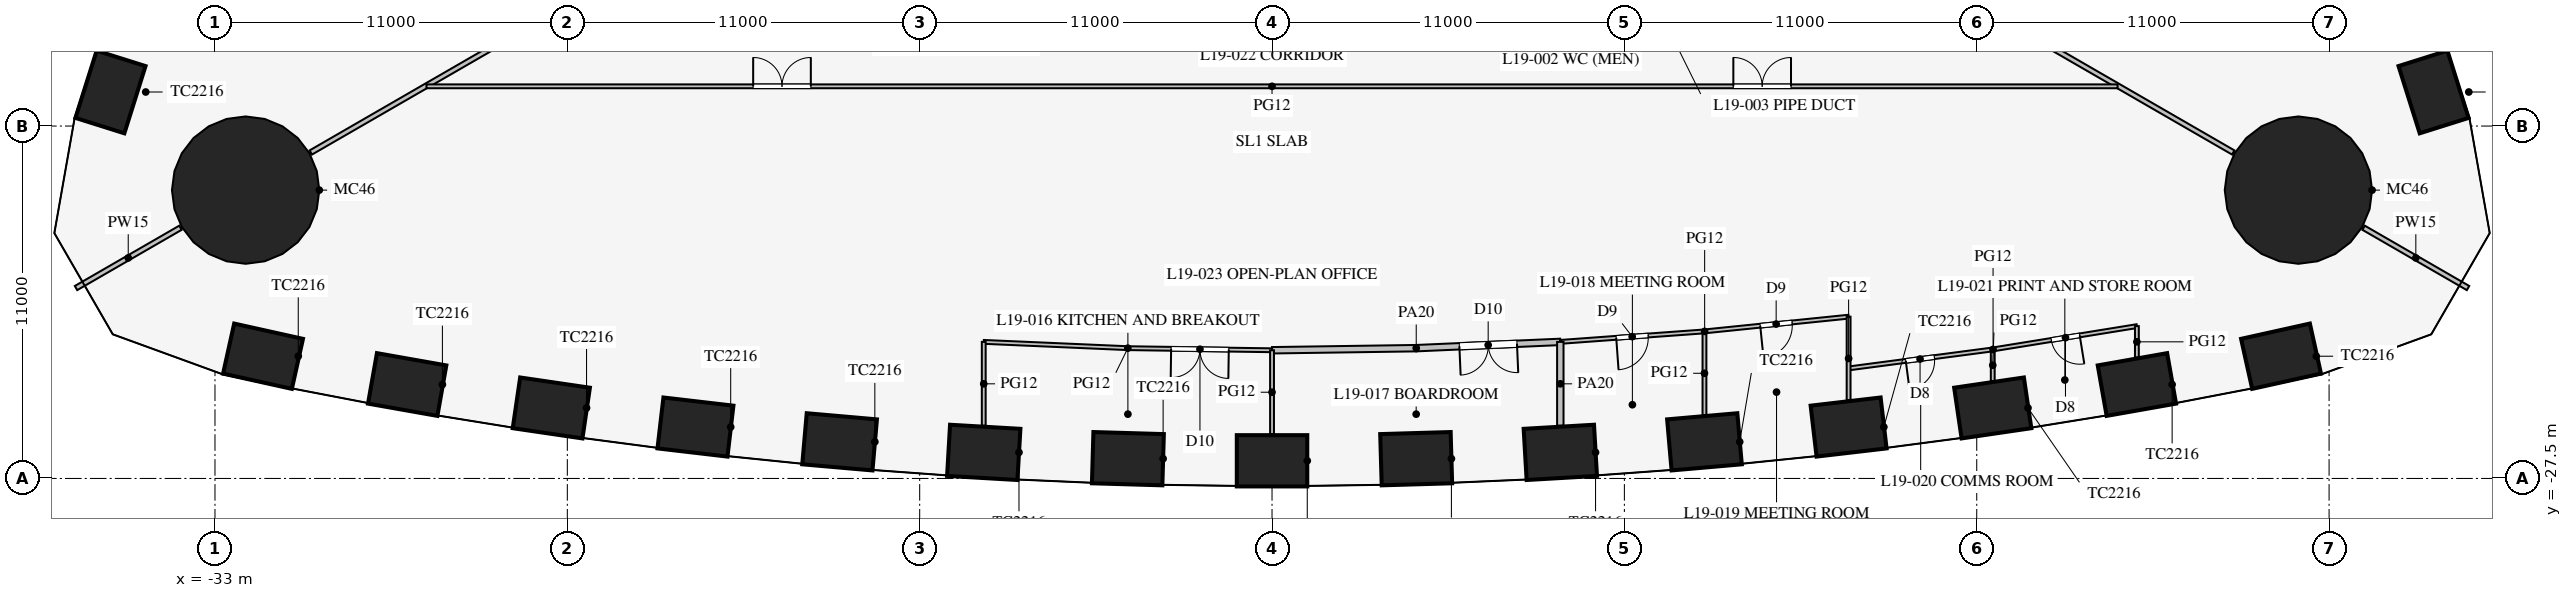
"""IFC4 building model, lengths in metres.
Left out: names, types, materials, properties, quantities, classifications, styles, units other than length and angle.
Written with IfcOpenShell. Run it as: python <this file> out.ifc"""

import sys

from ifc_helpers import new_model, si_unit, direction, frame, frame_2d, origin, origin_2d, place, context, subcontext, project, spatial, rectangle, circle, extrude, element, fill, save


model = new_model("IFC4")
c1 = context("Model", 3, precision=1e-05, world=origin(), true_north=direction((0.0, 1.0)))
c2 = subcontext(c1, "Body", "Model", "MODEL_VIEW")
j1 = project(units=[si_unit("LENGTHUNIT", "METRE"), si_unit("PLANEANGLEUNIT", "RADIAN")], contexts=[c1])
p1 = place(None, origin())
s1 = spatial("IfcSite", under=j1, at=p1, CompositionType="ELEMENT")
p2 = place(p1, origin())
s2 = spatial("IfcBuilding", under=s1, at=p2, CompositionType="ELEMENT")
p3 = place(p2, frame((0.0, 0.0, 83.7)))
s3 = spatial("IfcBuildingStorey", under=s2, at=p3, CompositionType="ELEMENT", Elevation=83.7)
for number, where, z_axis, x_axis in (
    (1, (-31.5, -23.685, 0.0), (0.0, 0.0, 1.0), (0.976, -0.217, 0.0)),
    (2, (-27.0, -24.568, 0.0), (0.0, 0.0, 1.0), (0.985, -0.174, 0.0)),
    (3, (-22.5, -25.299, 0.0), (0.0, 0.0, 1.0), (0.989, -0.145, 0.0)),
    (4, (-18.0, -25.895, 0.0), (0.0, 0.0, 1.0), (0.993, -0.116, 0.0)),
    (5, (-13.5, -26.357, 0.0), (0.0, 0.0, 1.0), (0.996, -0.087, 0.0)),
    (6, (-9.0, -26.686, 0.0), (0.0, 0.0, 1.0), (0.998, -0.058, 0.0)),
    (7, (-4.5, -26.883, 0.0), (0.0, 0.0, 1.0), (1.0, -0.029, 0.0)),
    (8, (0.0, -26.949, 0.0), (0.0, 0.0, 1.0), (1.0, 0.0, 0.0)),
    (9, (4.5, -26.883, 0.0), (0.0, 0.0, 1.0), (1.0, 0.029, 0.0)),
    (10, (9.0, -26.686, 0.0), (0.0, 0.0, 1.0), (0.998, 0.058, 0.0)),
    (11, (13.5, -26.357, 0.0), (0.0, 0.0, 1.0), (0.996, 0.087, 0.0)),
    (12, (18.0, -25.895, 0.0), (0.0, 0.0, 1.0), (0.993, 0.116, 0.0)),
    (13, (22.5, -25.299, 0.0), (0.0, 0.0, 1.0), (0.989, 0.145, 0.0)),
    (14, (27.0, -24.568, 0.0), (0.0, 0.0, 1.0), (0.985, 0.174, 0.0)),
    (15, (31.5, -23.685, 0.0), (0.0, 0.0, 1.0), (0.976, 0.217, 0.0)),
    (16, (36.262, -15.438, 0.0), (0.0, 0.0, 1.0), (-0.3, 0.954, 0.0)),
    (17, (-36.262, -15.438, 0.0), (0.0, 0.0, 1.0), (-0.3, -0.954, 0.0)),
):
    element("IfcColumn", number, at=place(p3, frame(where, z_axis=z_axis, x_axis=x_axis)), inside=s3, PredefinedType="COLUMN", context=c2, shape_type="SweptSolid", body=[
        extrude(rectangle(XDim=2.2, YDim=1.6, at=origin_2d()), origin(), (0.0, 0.0, 1.0), 4.2),
    ])
for number, where, z_axis, x_axis in (
    (18, (32.043, -18.5, 0.0), (0.0, 0.0, 1.0), (1.0, 0.0, 0.0)),
    (19, (-32.043, -18.5, 0.0), (0.0, 0.0, 1.0), (1.0, 0.0, 0.0)),
):
    element("IfcColumn", number, at=place(p3, frame(where, z_axis=z_axis, x_axis=x_axis)), inside=s3, PredefinedType="COLUMN", context=c2, shape_type="SweptSolid", body=[
        extrude(circle(Radius=2.3, at=origin_2d()), origin(), (0.0, 0.0, 1.0), 4.2),
    ])
p4 = place(p3, frame((14.203, -8.2, 0.0), z_axis=(0.0, 0.0, 1.0), x_axis=(0.866024965723, -0.500000758745, 0.0)))
e20 = element("IfcWall", 20, at=p4, inside=s3, PredefinedType="PARTITIONING", context=c2, shape_type="SweptSolid", body=[
    extrude(rectangle(XDim=18.25, YDim=0.15, at=frame_2d((9.125, 0.0))), origin(), (0.0, 0.0, 1.0), 2.3),
])
p5 = place(p3, frame((34.078, -19.675, 0.0), z_axis=(0.0, 0.0, 1.0), x_axis=(0.866019247219, -0.500010663332, 0.0)))
e21 = element("IfcWall", 21, at=p5, inside=s3, PredefinedType="PARTITIONING", context=c2, shape_type="SweptSolid", body=[
    extrude(rectangle(XDim=3.764, YDim=0.15, at=frame_2d((1.882, 0.0))), origin(), (0.0, 0.0, 1.0), 2.3),
])
p6 = place(p3, frame((-14.203, -8.2, 0.0), z_axis=(0.0, 0.0, 1.0), x_axis=(-0.866024965723, -0.500000758745, 0.0)))
e22 = element("IfcWall", 22, at=p6, inside=s3, PredefinedType="PARTITIONING", context=c2, shape_type="SweptSolid", body=[
    extrude(rectangle(XDim=18.25, YDim=0.15, at=frame_2d((9.125, 0.0))), origin(), (0.0, 0.0, 1.0), 2.3),
])
p7 = place(p3, frame((-34.078, -19.675, 0.0), z_axis=(0.0, 0.0, 1.0), x_axis=(-0.866019247219, -0.500010663332, 0.0)))
e23 = element("IfcWall", 23, at=p7, inside=s3, PredefinedType="PARTITIONING", context=c2, shape_type="SweptSolid", body=[
    extrude(rectangle(XDim=3.764, YDim=0.15, at=frame_2d((1.882, 0.0))), origin(), (0.0, 0.0, 1.0), 2.3),
])
p8 = place(p3, frame((-26.398, -15.26, 0.0), z_axis=(0.0, 0.0, 1.0), x_axis=(1.0, 0.0, 0.0)))
e24 = element("IfcWall", 24, at=p8, inside=s3, PredefinedType="PARTITIONING", context=c2, shape_type="SweptSolid", body=[
    extrude(rectangle(XDim=52.796, YDim=0.12, at=frame_2d((26.398, 0.0))), origin(), (0.0, 0.0, 1.0), 2.9),
])
p9 = place(p8, frame((10.2, 0.0, 0.15)))
e25 = element("IfcOpeningElement", 25, at=p9, cuts=e24, PredefinedType="OPENING", context=c2, shape_type="SweptSolid", body=[
    extrude(rectangle(XDim=1.8, YDim=2.1, at=frame_2d((0.9, 1.05))), frame((0.0, 0.07, 0.0), z_axis=(0.0, -1.0, 0.0), x_axis=(1.0, 0.0, 0.0)), (0.0, 0.0, 1.0), 0.14),
])
p10 = place(p8, frame((40.8, 0.0, 0.15)))
e26 = element("IfcOpeningElement", 26, at=p10, cuts=e24, PredefinedType="OPENING", context=c2, shape_type="SweptSolid", body=[
    extrude(rectangle(XDim=1.8, YDim=2.1, at=frame_2d((0.9, 1.05))), frame((0.0, 0.07, 0.0), z_axis=(0.0, -1.0, 0.0), x_axis=(1.0, 0.0, 0.0)), (0.0, 0.0, 1.0), 0.14),
])
p11 = place(p3, frame((0.0, -23.499, 0.0), z_axis=(0.0, 0.0, 1.0), x_axis=(0.999894311967, 0.014538393859, 0.0)))
e27 = element("IfcWall", 27, at=p11, inside=s3, PredefinedType="PARTITIONING", context=c2, shape_type="SweptSolid", body=[
    extrude(rectangle(XDim=4.5, YDim=0.2, at=frame_2d((2.25, 0.0))), origin(), (0.0, 0.0, 1.0), 2.9),
])
p12 = place(p3, frame((13.5, -22.91, 0.0), z_axis=(0.0, 0.0, 1.0), x_axis=(0.994833141332, 0.101523499286, 0.0)))
e28 = element("IfcWall", 28, at=p12, inside=s3, PredefinedType="PARTITIONING", context=c2, shape_type="SweptSolid", body=[
    extrude(rectangle(XDim=4.523, YDim=0.12, at=frame_2d((2.262, 0.0))), origin(), (0.0, 0.0, 1.0), 2.9),
])
p13 = place(p12, frame((1.75, 0.0, 0.15)))
e29 = element("IfcOpeningElement", 29, at=p13, cuts=e28, PredefinedType="OPENING", context=c2, shape_type="SweptSolid", body=[
    extrude(rectangle(XDim=1.0, YDim=2.1, at=frame_2d((0.5, 1.05))), frame((0.0, 0.07, 0.0), z_axis=(0.0, -1.0, 0.0), x_axis=(1.0, 0.0, 0.0)), (0.0, 0.0, 1.0), 0.14),
])
p14 = place(p3, frame((18.0, -24.066, 0.0), z_axis=(0.0, 0.0, 1.0), x_axis=(0.991435244698, 0.130599217346, 0.0)))
e30 = element("IfcWall", 30, at=p14, inside=s3, PredefinedType="PARTITIONING", context=c2, shape_type="SweptSolid", body=[
    extrude(rectangle(XDim=4.539, YDim=0.12, at=frame_2d((2.27, 0.0))), origin(), (0.0, 0.0, 1.0), 2.9),
])
p15 = place(p14, frame((1.8, 0.0, 0.15)))
e31 = element("IfcOpeningElement", 31, at=p15, cuts=e30, PredefinedType="OPENING", context=c2, shape_type="SweptSolid", body=[
    extrude(rectangle(XDim=0.9, YDim=2.1, at=frame_2d((0.45, 1.05))), frame((0.0, 0.07, 0.0), z_axis=(0.0, -1.0, 0.0), x_axis=(1.0, 0.0, 0.0)), (0.0, 0.0, 1.0), 0.14),
])
p16 = place(p3, frame((22.5, -23.473, 0.0), z_axis=(0.0, 0.0, 1.0), x_axis=(0.987181300889, 0.159602879593, 0.0)))
e32 = element("IfcWall", 32, at=p16, inside=s3, PredefinedType="PARTITIONING", context=c2, shape_type="SweptSolid", body=[
    extrude(rectangle(XDim=4.558, YDim=0.12, at=frame_2d((2.279, 0.0))), origin(), (0.0, 0.0, 1.0), 2.9),
])
p17 = place(p16, frame((1.85, 0.0, 0.15)))
e33 = element("IfcOpeningElement", 33, at=p17, cuts=e32, PredefinedType="OPENING", context=c2, shape_type="SweptSolid", body=[
    extrude(rectangle(XDim=0.9, YDim=2.1, at=frame_2d((0.45, 1.05))), frame((0.0, 0.07, 0.0), z_axis=(0.0, -1.0, 0.0), x_axis=(1.0, 0.0, 0.0)), (0.0, 0.0, 1.0), 0.14),
])
p18 = place(p3, frame((4.5, -23.433, 0.0), z_axis=(0.0, 0.0, 1.0), x_axis=(0.999052370647, 0.043524254212, 0.0)))
e34 = element("IfcWall", 34, at=p18, inside=s3, PredefinedType="PARTITIONING", context=c2, shape_type="SweptSolid", body=[
    extrude(rectangle(XDim=4.504, YDim=0.2, at=frame_2d((2.252, 0.0))), origin(), (0.0, 0.0, 1.0), 2.9),
])
p19 = place(p18, frame((1.35, 0.0, 0.15)))
e35 = element("IfcOpeningElement", 35, at=p19, cuts=e34, PredefinedType="OPENING", context=c2, shape_type="SweptSolid", body=[
    extrude(rectangle(XDim=1.8, YDim=2.1, at=frame_2d((0.9, 1.05))), frame((0.0, 0.11, 0.0), z_axis=(0.0, -1.0, 0.0), x_axis=(1.0, 0.0, 0.0)), (0.0, 0.0, 1.0), 0.22),
])
p20 = place(p3, frame((9.0, -23.237, 0.0), z_axis=(0.0, 0.0, 1.0), x_axis=(0.997363894896, 0.072562119306, 0.0)))
e36 = element("IfcWall", 36, at=p20, inside=s3, PredefinedType="PARTITIONING", context=c2, shape_type="SweptSolid", body=[
    extrude(rectangle(XDim=4.512, YDim=0.12, at=frame_2d((2.256, 0.0))), origin(), (0.0, 0.0, 1.0), 2.9),
])
p21 = place(p20, frame((1.75, 0.0, 0.15)))
e37 = element("IfcOpeningElement", 37, at=p21, cuts=e36, PredefinedType="OPENING", context=c2, shape_type="SweptSolid", body=[
    extrude(rectangle(XDim=1.0, YDim=2.1, at=frame_2d((0.5, 1.05))), frame((0.0, 0.07, 0.0), z_axis=(0.0, -1.0, 0.0), x_axis=(1.0, 0.0, 0.0)), (0.0, 0.0, 1.0), 0.14),
])
p22 = place(p3, frame((-4.5, -23.433, 0.0), z_axis=(0.0, 0.0, 1.0), x_axis=(0.999894311967, -0.014538393859, 0.0)))
e38 = element("IfcWall", 38, at=p22, inside=s3, PredefinedType="PARTITIONING", context=c2, shape_type="SweptSolid", body=[
    extrude(rectangle(XDim=4.5, YDim=0.12, at=frame_2d((2.25, 0.0))), origin(), (0.0, 0.0, 1.0), 2.9),
])
p23 = place(p22, frame((1.35, 0.0, 0.15)))
e39 = element("IfcOpeningElement", 39, at=p23, cuts=e38, PredefinedType="OPENING", context=c2, shape_type="SweptSolid", body=[
    extrude(rectangle(XDim=1.8, YDim=2.1, at=frame_2d((0.9, 1.05))), frame((0.0, 0.07, 0.0), z_axis=(0.0, -1.0, 0.0), x_axis=(1.0, 0.0, 0.0)), (0.0, 0.0, 1.0), 0.14),
])
p24 = place(p3, frame((-9.0, -23.237, 0.0), z_axis=(0.0, 0.0, 1.0), x_axis=(0.999052370647, -0.043524254212, 0.0)))
e40 = element("IfcWall", 40, at=p24, inside=s3, PredefinedType="PARTITIONING", context=c2, shape_type="SweptSolid", body=[
    extrude(rectangle(XDim=4.504, YDim=0.12, at=frame_2d((2.252, 0.0))), origin(), (0.0, 0.0, 1.0), 2.9),
])
p25 = place(p3, frame((0.0, -23.499, 0.0), z_axis=(0.0, 0.0, 1.0), x_axis=(0.0, -1.0, 0.0)))
e41 = element("IfcWall", 41, at=p25, inside=s3, PredefinedType="PARTITIONING", context=c2, shape_type="SweptSolid", body=[
    extrude(rectangle(XDim=2.62, YDim=0.12, at=frame_2d((1.31, 0.0))), origin(), (0.0, 0.0, 1.0), 2.6),
])
p26 = place(p3, frame((13.5, -22.91, 0.0), z_axis=(0.0, 0.0, 1.0), x_axis=(0.0, -1.0, 0.0)))
e42 = element("IfcWall", 42, at=p26, inside=s3, PredefinedType="PARTITIONING", context=c2, shape_type="SweptSolid", body=[
    extrude(rectangle(XDim=2.614, YDim=0.12, at=frame_2d((1.307, 0.0))), origin(), (0.0, 0.0, 1.0), 2.4),
])
p27 = place(p3, frame((18.0, -22.451, 0.0), z_axis=(0.0, 0.0, 1.0), x_axis=(0.0, -1.0, 0.0)))
e43 = element("IfcWall", 43, at=p27, inside=s3, PredefinedType="PARTITIONING", context=c2, shape_type="SweptSolid", body=[
    extrude(rectangle(XDim=2.609, YDim=0.12, at=frame_2d((1.304, 0.0))), origin(), (0.0, 0.0, 1.0), 2.4),
])
p28 = place(p3, frame((22.5, -23.473, 0.0), z_axis=(0.0, 0.0, 1.0), x_axis=(0.0, -1.0, 0.0)))
e44 = element("IfcWall", 44, at=p28, inside=s3, PredefinedType="PARTITIONING", context=c2, shape_type="SweptSolid", body=[
    extrude(rectangle(XDim=0.988, YDim=0.12, at=frame_2d((0.494, 0.0))), origin(), (0.0, 0.0, 1.0), 2.6),
])
p29 = place(p3, frame((27.0, -22.745, 0.0), z_axis=(0.0, 0.0, 1.0), x_axis=(0.0, -1.0, 0.0)))
e45 = element("IfcWall", 45, at=p29, inside=s3, PredefinedType="PARTITIONING", context=c2, shape_type="SweptSolid", body=[
    extrude(rectangle(XDim=0.98, YDim=0.12, at=frame_2d((0.49, 0.0))), origin(), (0.0, 0.0, 1.0), 2.9),
])
p30 = place(p3, frame((9.0, -23.237, 0.0), z_axis=(0.0, 0.0, 1.0), x_axis=(0.0, -1.0, 0.0)))
e46 = element("IfcWall", 46, at=p30, inside=s3, PredefinedType="PARTITIONING", context=c2, shape_type="SweptSolid", body=[
    extrude(rectangle(XDim=2.617, YDim=0.2, at=frame_2d((1.309, 0.0))), origin(), (0.0, 0.0, 1.0), 2.6),
])
p31 = place(p3, frame((-9.0, -23.237, 0.0), z_axis=(0.0, 0.0, 1.0), x_axis=(0.0, -1.0, 0.0)))
e47 = element("IfcWall", 47, at=p31, inside=s3, PredefinedType="PARTITIONING", context=c2, shape_type="SweptSolid", body=[
    extrude(rectangle(XDim=2.617, YDim=0.12, at=frame_2d((1.309, 0.0))), origin(), (0.0, 0.0, 1.0), 2.6),
])
p32 = place(p23, frame((1.8, 0.0, 0.0), z_axis=(0.0, 0.0, 1.0), x_axis=(-1.0, 0.0, 0.0)))
e48 = element("IfcDoor", 48, at=p32, inside=s3, OperationType="DOUBLE_DOOR_SINGLE_SWING", PredefinedType="DOOR", context=c2, shape_type="SweptSolid", body=[
    extrude(rectangle(XDim=1.8, YDim=2.1, at=frame_2d((0.9, 1.05))), frame((0.0, 0.025, 0.0), z_axis=(0.0, -1.0, 0.0), x_axis=(1.0, 0.0, 0.0)), (0.0, 0.0, 1.0), 0.05),
])
fill(e39, e48)
p33 = place(p19, frame((1.8, 0.0, 0.0), z_axis=(0.0, 0.0, 1.0), x_axis=(-1.0, 0.0, 0.0)))
e49 = element("IfcDoor", 49, at=p33, inside=s3, OperationType="DOUBLE_DOOR_SINGLE_SWING", PredefinedType="DOOR", context=c2, shape_type="SweptSolid", body=[
    extrude(rectangle(XDim=1.8, YDim=2.1, at=frame_2d((0.9, 1.05))), frame((0.0, 0.025, 0.0), z_axis=(0.0, -1.0, 0.0), x_axis=(1.0, 0.0, 0.0)), (0.0, 0.0, 1.0), 0.05),
])
fill(e35, e49)
p34 = place(p21, frame((1.0, 0.0, 0.0), z_axis=(0.0, 0.0, 1.0), x_axis=(-1.0, 0.0, 0.0)))
e50 = element("IfcDoor", 50, at=p34, inside=s3, OperationType="SINGLE_SWING_RIGHT", PredefinedType="DOOR", context=c2, shape_type="SweptSolid", body=[
    extrude(rectangle(XDim=1.0, YDim=2.1, at=frame_2d((0.5, 1.05))), frame((0.0, 0.025, 0.0), z_axis=(0.0, -1.0, 0.0), x_axis=(1.0, 0.0, 0.0)), (0.0, 0.0, 1.0), 0.05),
])
fill(e37, e50)
p35 = place(p13, frame((1.0, 0.0, 0.0), z_axis=(0.0, 0.0, 1.0), x_axis=(-1.0, 0.0, 0.0)))
e51 = element("IfcDoor", 51, at=p35, inside=s3, OperationType="SINGLE_SWING_RIGHT", PredefinedType="DOOR", context=c2, shape_type="SweptSolid", body=[
    extrude(rectangle(XDim=1.0, YDim=2.1, at=frame_2d((0.5, 1.05))), frame((0.0, 0.025, 0.0), z_axis=(0.0, -1.0, 0.0), x_axis=(1.0, 0.0, 0.0)), (0.0, 0.0, 1.0), 0.05),
])
fill(e29, e51)
p36 = place(p15, frame((0.9, 0.0, 0.0), z_axis=(0.0, 0.0, 1.0), x_axis=(-1.0, 0.0, 0.0)))
e52 = element("IfcDoor", 52, at=p36, inside=s3, OperationType="SINGLE_SWING_RIGHT", PredefinedType="DOOR", context=c2, shape_type="SweptSolid", body=[
    extrude(rectangle(XDim=0.9, YDim=2.1, at=frame_2d((0.45, 1.05))), frame((0.0, 0.025, 0.0), z_axis=(0.0, -1.0, 0.0), x_axis=(1.0, 0.0, 0.0)), (0.0, 0.0, 1.0), 0.05),
])
fill(e31, e52)
p37 = place(p17, frame((0.9, 0.0, 0.0), z_axis=(0.0, 0.0, 1.0), x_axis=(-1.0, 0.0, 0.0)))
e53 = element("IfcDoor", 53, at=p37, inside=s3, OperationType="SINGLE_SWING_LEFT", PredefinedType="DOOR", context=c2, shape_type="SweptSolid", body=[
    extrude(rectangle(XDim=0.9, YDim=2.1, at=frame_2d((0.45, 1.05))), frame((0.0, 0.025, 0.0), z_axis=(0.0, -1.0, 0.0), x_axis=(1.0, 0.0, 0.0)), (0.0, 0.0, 1.0), 0.05),
])
fill(e33, e53)
p38 = place(p9, origin())
e54 = element("IfcDoor", 54, at=p38, inside=s3, OperationType="DOUBLE_DOOR_SINGLE_SWING", PredefinedType="DOOR", context=c2, shape_type="SweptSolid", body=[
    extrude(rectangle(XDim=1.8, YDim=2.1, at=frame_2d((0.9, 1.05))), frame((0.0, 0.025, 0.0), z_axis=(0.0, -1.0, 0.0), x_axis=(1.0, 0.0, 0.0)), (0.0, 0.0, 1.0), 0.05),
])
fill(e25, e54)
p39 = place(p10, origin())
e55 = element("IfcDoor", 55, at=p39, inside=s3, OperationType="DOUBLE_DOOR_SINGLE_SWING", PredefinedType="DOOR", context=c2, shape_type="SweptSolid", body=[
    extrude(rectangle(XDim=1.8, YDim=2.1, at=frame_2d((0.9, 1.05))), frame((0.0, 0.025, 0.0), z_axis=(0.0, -1.0, 0.0), x_axis=(1.0, 0.0, 0.0)), (0.0, 0.0, 1.0), 0.05),
])
fill(e26, e55)
save(model, sys.argv[1])
